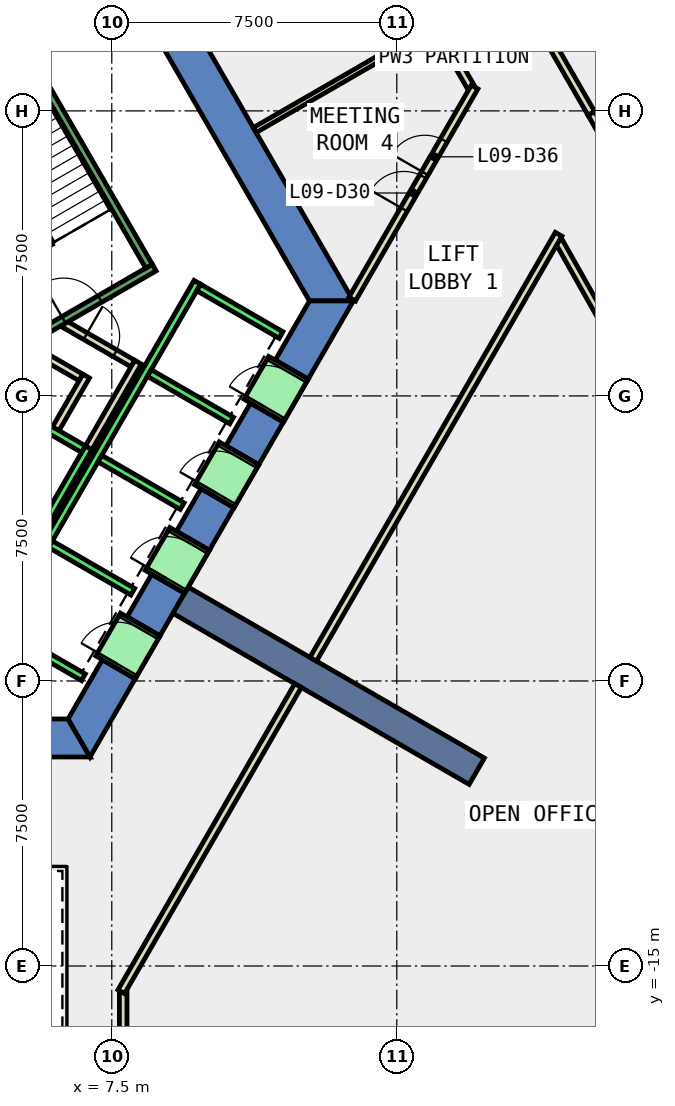
"""IFC4 building model, lengths in metres.
Left out: names, types, materials, properties, quantities, classifications, styles, units other than length and angle.
Written with IfcOpenShell. Run it as: python <this file> out.ifc"""

import sys

from ifc_helpers import new_model, si_unit, direction, frame, frame_2d, origin, place, context, subcontext, project, spatial, polyline, rectangle, outline, extrude, element, fill, save


model = new_model("IFC4")
c1 = context("Model", 3, precision=1e-05, world=origin(), true_north=direction((0.0, 1.0)))
c2 = subcontext(c1, "Body", "Model", "MODEL_VIEW")
j1 = project(units=[si_unit("LENGTHUNIT", "METRE"), si_unit("PLANEANGLEUNIT", "RADIAN")], contexts=[c1])
p1 = place(None, origin())
s1 = spatial("IfcSite", under=j1, at=p1, CompositionType="ELEMENT")
p2 = place(p1, origin())
s2 = spatial("IfcBuilding", under=s1, at=p2, CompositionType="ELEMENT")
p3 = place(p2, frame((0.0, 0.0, 47.6)))
s3 = spatial("IfcBuildingStorey", under=s2, at=p3, CompositionType="ELEMENT", Elevation=47.6)
p4 = place(p3, frame((0.0, 0.0, -0.4)))
e1 = element("IfcWall", 1, at=p4, inside=s3, PredefinedType="SHEAR", context=c2, shape_type="SweptSolid", body=[
    extrude(outline(polyline([(8.517, 11.748), (7.651, 11.248), (12.702, 2.5), (13.856, 2.5), (8.517, 11.748)])), origin(), (0.0, 0.0, 1.0), 4.2),
])
p5 = place(p3, frame((0.0, 0.0, -0.4)))
e2 = element("IfcWall", 2, at=p5, inside=s3, PredefinedType="SHEAR", context=c2, shape_type="SweptSolid", body=[
    extrude(outline(polyline([(5.75, -8.5), (5.75, -9.5), (6.928, -9.5), (6.351, -8.5), (5.75, -8.5)])), origin(), (0.0, 0.0, 1.0), 4.2),
])
p6 = place(p3, frame((0.0, 0.0, -0.4)))
e3 = element("IfcWall", 3, at=p6, inside=s3, PredefinedType="SHEAR", context=c2, shape_type="SweptSolid", body=[
    extrude(outline(polyline([(8.117, -7.44), (7.252, -6.94), (6.351, -8.5), (6.928, -9.5), (8.117, -7.44)])), origin(), (0.0, 0.0, 1.0), 4.2),
])
p7 = place(p3, frame((0.0, 0.0, -0.4)))
e4 = element("IfcWall", 4, at=p7, inside=s3, PredefinedType="SHEAR", context=c2, shape_type="SweptSolid", body=[
    extrude(outline(polyline([(9.417, -5.189), (8.551, -4.689), (7.902, -5.814), (8.767, -6.314), (9.417, -5.189)])), origin(), (0.0, 0.0, 1.0), 4.2),
])
p8 = place(p3, frame((0.0, 0.0, -0.4)))
e5 = element("IfcWall", 5, at=p8, inside=s3, PredefinedType="SHEAR", context=c2, shape_type="SweptSolid", body=[
    extrude(outline(polyline([(10.717, -2.937), (9.851, -2.437), (9.201, -3.563), (10.067, -4.063), (10.717, -2.937)])), origin(), (0.0, 0.0, 1.0), 4.2),
])
p9 = place(p3, frame((0.0, 0.0, -0.4)))
e6 = element("IfcWall", 6, at=p9, inside=s3, PredefinedType="SHEAR", context=c2, shape_type="SweptSolid", body=[
    extrude(outline(polyline([(12.017, -0.686), (11.151, -0.186), (10.501, -1.311), (11.367, -1.811), (12.017, -0.686)])), origin(), (0.0, 0.0, 1.0), 4.2),
])
p10 = place(p3, frame((0.0, 0.0, -0.4)))
e7 = element("IfcWall", 7, at=p10, inside=s3, PredefinedType="SHEAR", context=c2, shape_type="SweptSolid", body=[
    extrude(outline(polyline([(11.801, 0.94), (12.667, 0.44), (13.856, 2.5), (12.702, 2.5), (11.801, 0.94)])), origin(), (0.0, 0.0, 1.0), 4.2),
])
p11 = place(p3, frame((0.0, 0.0, 3.6)))
e8 = element("IfcWall", 8, at=p11, inside=s3, PredefinedType="SHEAR", context=c2, shape_type="SweptSolid", body=[
    extrude(outline(polyline([(8.767, -6.314), (7.902, -5.814), (7.252, -6.94), (8.117, -7.44), (8.767, -6.314)])), origin(), (0.0, 0.0, 1.0), 0.2),
])
p12 = place(p3, frame((0.0, 0.0, 3.6)))
e9 = element("IfcWall", 9, at=p12, inside=s3, PredefinedType="SHEAR", context=c2, shape_type="SweptSolid", body=[
    extrude(outline(polyline([(10.067, -4.063), (9.201, -3.563), (8.551, -4.689), (9.417, -5.189), (10.067, -4.063)])), origin(), (0.0, 0.0, 1.0), 0.2),
])
p13 = place(p3, frame((0.0, 0.0, 3.6)))
e10 = element("IfcWall", 10, at=p13, inside=s3, PredefinedType="SHEAR", context=c2, shape_type="SweptSolid", body=[
    extrude(outline(polyline([(11.367, -1.811), (10.501, -1.311), (9.851, -2.437), (10.717, -2.937), (11.367, -1.811)])), origin(), (0.0, 0.0, 1.0), 0.2),
])
p14 = place(p3, frame((0.0, 0.0, 3.6)))
e11 = element("IfcWall", 11, at=p14, inside=s3, PredefinedType="SHEAR", context=c2, shape_type="SweptSolid", body=[
    extrude(outline(polyline([(12.667, 0.44), (11.801, 0.94), (11.151, -0.186), (12.017, -0.686), (12.667, 0.44)])), origin(), (0.0, 0.0, 1.0), 0.2),
])
p15 = place(p3, frame((9.31, -5.375, -0.4), z_axis=(0.0, 0.0, 1.0), x_axis=(0.866017533419, -0.500013631625, 0.0)))
e12 = element("IfcWall", 12, at=p15, inside=s3, PredefinedType="SHEAR", context=c2, shape_type="SweptSolid", body=[
    extrude(rectangle(XDim=9.0, YDim=0.8, at=frame_2d((4.5, 0.0))), origin(), (0.0, 0.0, 1.0), 4.2),
])
p16 = place(p3, frame((16.948, 8.128, 0.0), z_axis=(0.0, 0.0, 1.0), x_axis=(-0.499931460552, 0.866064971437, 0.0)))
e13 = element("IfcWall", 13, at=p16, inside=s3, PredefinedType="PARTITIONING", context=c2, shape_type="SweptSolid", body=[
    extrude(rectangle(XDim=1.786, YDim=0.2, at=frame_2d((0.893, 0.0))), origin(), (0.0, 0.0, 1.0), 3.8),
])
p17 = place(p3, frame((21.585, -0.045, 0.0), z_axis=(0.0, 0.0, 1.0), x_axis=(-0.491542684896, 0.870853483042, 0.0)))
e14 = element("IfcWall", 14, at=p17, inside=s3, PredefinedType="PARTITIONING", context=c2, shape_type="SweptSolid", body=[
    extrude(rectangle(XDim=4.738, YDim=0.2, at=frame_2d((2.369, 0.0))), origin(), (0.0, 0.0, 1.0), 3.8),
])
p18 = place(p3, frame((16.46, 13.772, 0.0), z_axis=(0.0, 0.0, 1.0), x_axis=(0.500099745063, -0.865967808286, 0.0)))
e15 = element("IfcWall", 15, at=p18, inside=s3, PredefinedType="PARTITIONING", context=c2, shape_type="SweptSolid", body=[
    extrude(rectangle(XDim=7.319, YDim=0.2, at=frame_2d((3.659, 0.0))), origin(), (0.0, 0.0, 1.0), 3.8),
])
p19 = place(p18, frame((3.159, 0.0, 0.0)))
e16 = element("IfcOpeningElement", 16, at=p19, cuts=e15, PredefinedType="OPENING", context=c2, shape_type="SweptSolid", body=[
    extrude(rectangle(XDim=1.0, YDim=2.1, at=frame_2d((0.5, 1.05))), frame((0.0, 0.11, 0.0), z_axis=(0.0, -1.0, 0.0), x_axis=(1.0, 0.0, 0.0)), (0.0, 0.0, 1.0), 0.22),
])
p20 = place(p3, frame((20.12, 7.434, 0.0), z_axis=(0.0, 0.0, 1.0), x_axis=(0.491394823876, -0.87093692485, 0.0)))
e17 = element("IfcWall", 17, at=p20, inside=s3, PredefinedType="PARTITIONING", context=c2, shape_type="SweptSolid", body=[
    extrude(rectangle(XDim=3.547, YDim=0.2, at=frame_2d((1.773, 0.0))), origin(), (0.0, 0.0, 1.0), 3.8),
])
p21 = place(p3, frame((5.499, 1.172, 0.0), z_axis=(0.0, 0.0, 1.0), x_axis=(0.866333505267, -0.499465972466, 0.0)))
e18 = element("IfcWall", 18, at=p21, inside=s3, PredefinedType="PARTITIONING", context=c2, shape_type="SweptSolid", body=[
    extrude(rectangle(XDim=1.374, YDim=0.2, at=frame_2d((0.687, 0.0))), origin(), (0.0, 0.0, 1.0), 3.8),
])
p22 = place(p3, frame((6.826, 0.522, 0.0), z_axis=(0.0, 0.0, 1.0), x_axis=(-0.500016722714, -0.866015748706, 0.0)))
e19 = element("IfcWall", 19, at=p22, inside=s3, PredefinedType="PARTITIONING", context=c2, shape_type="SweptSolid", body=[
    extrude(rectangle(XDim=1.7, YDim=0.2, at=frame_2d((0.85, 0.0))), origin(), (0.0, 0.0, 1.0), 3.8),
])
p23 = place(p3, frame((6.25, 1.894, 0.0), z_axis=(0.0, 0.0, 1.0), x_axis=(0.866043184279, -0.499969202016, 0.0)))
e20 = element("IfcWall", 20, at=p23, inside=s3, PredefinedType="PARTITIONING", context=c2, shape_type="SweptSolid", body=[
    extrude(rectangle(XDim=2.084, YDim=0.2, at=frame_2d((1.042, 0.0))), origin(), (0.0, 0.0, 1.0), 3.8),
])
p24 = place(p23, frame((0.642, 0.0, 0.0)))
e21 = element("IfcOpeningElement", 21, at=p24, cuts=e20, PredefinedType="OPENING", context=c2, shape_type="SweptSolid", body=[
    extrude(rectangle(XDim=0.9, YDim=2.1, at=frame_2d((0.45, 1.05))), frame((0.0, 0.11, 0.0), z_axis=(0.0, -1.0, 0.0), x_axis=(1.0, 0.0, 0.0)), (0.0, 0.0, 1.0), 0.22),
])
p25 = place(p3, frame((8.192, 0.888, 0.0), z_axis=(0.0, 0.0, 1.0), x_axis=(-0.499940625693, -0.866059680843, 0.0)))
e22 = element("IfcWall", 22, at=p25, inside=s3, PredefinedType="PARTITIONING", context=c2, shape_type="SweptSolid", body=[
    extrude(rectangle(XDim=2.68, YDim=0.2, at=frame_2d((1.34, 0.0))), origin(), (0.0, 0.0, 1.0), 3.8),
])
p26 = place(p3, frame((16.104, 9.79, 0.0), z_axis=(0.0, 0.0, 1.0), x_axis=(-0.866023462144, -0.500003363005, 0.0)))
e23 = element("IfcWall", 23, at=p26, inside=s3, PredefinedType="PARTITIONING", context=c2, shape_type="SweptSolid", body=[
    extrude(rectangle(XDim=5.592, YDim=0.15, at=frame_2d((2.796, 0.0))), origin(), (0.0, 0.0, 1.0), 3.8),
])
p27 = place(p3, frame((13.827, 2.55, 0.0), z_axis=(0.0, 0.0, 1.0), x_axis=(0.500093193185, 0.865971591988, 0.0)))
e24 = element("IfcWall", 24, at=p27, inside=s3, PredefinedType="PARTITIONING", context=c2, shape_type="SweptSolid", body=[
    extrude(rectangle(XDim=6.441, YDim=0.2, at=frame_2d((3.221, 0.0))), origin(), (0.0, 0.0, 1.0), 3.8),
])
p28 = place(p27, frame((2.721, 0.0, 0.0)))
e25 = element("IfcOpeningElement", 25, at=p28, cuts=e24, PredefinedType="OPENING", context=c2, shape_type="SweptSolid", body=[
    extrude(rectangle(XDim=1.0, YDim=2.1, at=frame_2d((0.5, 1.05))), frame((0.0, 0.11, 0.0), z_axis=(0.0, -1.0, 0.0), x_axis=(1.0, 0.0, 0.0)), (0.0, 0.0, 1.0), 0.22),
])
p29 = place(p27, frame((3.821, 0.0, 0.0)))
e26 = element("IfcOpeningElement", 26, at=p29, cuts=e24, PredefinedType="OPENING", context=c2, shape_type="SweptSolid", body=[
    extrude(rectangle(XDim=1.0, YDim=2.1, at=frame_2d((0.5, 1.05))), frame((0.0, 0.11, 0.0), z_axis=(0.0, -1.0, 0.0), x_axis=(1.0, 0.0, 0.0)), (0.0, 0.0, 1.0), 0.22),
])
p30 = place(p3, frame((7.8, -15.69, 0.0), z_axis=(0.0, 0.0, 1.0), x_axis=(0.0, -1.0, 0.0)))
e27 = element("IfcWall", 27, at=p30, inside=s3, PredefinedType="PARTITIONING", context=c2, shape_type="SweptSolid", body=[
    extrude(rectangle(XDim=2.919, YDim=0.2, at=frame_2d((1.459, 0.0))), origin(), (0.0, 0.0, 1.0), 3.8),
])
p31 = place(p3, frame((19.257, 4.255, 0.0), z_axis=(0.0, 0.0, 1.0), x_axis=(-0.499978317034, -0.866037922089, 0.0)))
e28 = element("IfcWall", 28, at=p31, inside=s3, PredefinedType="PARTITIONING", context=c2, shape_type="SweptSolid", body=[
    extrude(rectangle(XDim=12.913, YDim=0.2, at=frame_2d((6.456, 0.0))), origin(), (0.0, 0.0, 1.0), 3.8),
])
p32 = place(p3, frame((12.401, -7.621, 0.0), z_axis=(0.0, 0.0, 1.0), x_axis=(-0.499983724212, -0.866034800411, 0.0)))
e29 = element("IfcWall", 29, at=p32, inside=s3, PredefinedType="PARTITIONING", context=c2, shape_type="SweptSolid", body=[
    extrude(rectangle(XDim=9.302, YDim=0.2, at=frame_2d((4.651, 0.0))), origin(), (0.0, 0.0, 1.0), 3.8),
])
p33 = place(p3, frame((5.492, -3.788, 0.0), z_axis=(0.0, 0.0, 1.0), x_axis=(0.500011755427, 0.866018616679, 0.0)))
e30 = element("IfcWall", 30, at=p33, inside=s3, PredefinedType="STANDARD", context=c2, shape_type="SweptSolid", body=[
    extrude(rectangle(XDim=2.8, YDim=0.2, at=frame_2d((1.4, 0.0))), origin(), (0.0, 0.0, 1.0), 3.8),
])
p34 = place(p3, frame((4.677, -0.2, 0.0), z_axis=(0.0, 0.0, 1.0), x_axis=(0.865973769406, -0.500089422704, 0.0)))
e31 = element("IfcWall", 31, at=p34, inside=s3, PredefinedType="STANDARD", context=c2, shape_type="SweptSolid", body=[
    extrude(rectangle(XDim=2.399, YDim=0.2, at=frame_2d((1.2, 0.0))), origin(), (0.0, 0.0, 1.0), 3.8),
])
p35 = place(p3, frame((4.451, -6.19, 0.0), z_axis=(0.0, 0.0, 1.0), x_axis=(0.50000090737, 0.866024879913, 0.0)))
e32 = element("IfcWall", 32, at=p35, inside=s3, PredefinedType="STANDARD", context=c2, shape_type="SweptSolid", body=[
    extrude(rectangle(XDim=10.6, YDim=0.2, at=frame_2d((5.3, 0.0))), origin(), (0.0, 0.0, 1.0), 3.8),
])
for number, where, z_axis, x_axis in (
    (33, (4.588, -6.153, 0.0), (0.0, 0.0, 1.0), (0.866, -0.5, 0.0)),
    (34, (5.888, -3.902, 0.0), (0.0, 0.0, 1.0), (0.866, -0.5, 0.0)),
    (35, (7.188, -1.65, 0.0), (0.0, 0.0, 1.0), (0.866, -0.5, 0.0)),
    (36, (8.488, 0.602, 0.0), (0.0, 0.0, 1.0), (0.866, -0.5, 0.0)),
):
    element("IfcWall", number, at=place(p3, frame(where, z_axis=z_axis, x_axis=x_axis)), inside=s3, PredefinedType="STANDARD", context=c2, shape_type="SweptSolid", body=[
        extrude(rectangle(XDim=2.5, YDim=0.2, at=frame_2d((1.25, 0.0))), origin(), (0.0, 0.0, 1.0), 3.8),
    ])
p36 = place(p3, frame((9.788, 2.853, 0.0), z_axis=(0.0, 0.0, 1.0), x_axis=(0.865998541277, -0.500046524342, 0.0)))
e37 = element("IfcWall", 37, at=p36, inside=s3, PredefinedType="STANDARD", context=c2, shape_type="SweptSolid", body=[
    extrude(rectangle(XDim=2.5, YDim=0.2, at=frame_2d((1.25, 0.0))), origin(), (0.0, 0.0, 1.0), 3.8),
])
p37 = place(p3, frame((7.598, -7.14, 0.0), z_axis=(0.0, 0.0, 1.0), x_axis=(0.500362116554, 0.865816234728, 0.0)))
e38 = element("IfcWall", 38, at=p37, inside=s3, PredefinedType="STANDARD", context=c2, shape_type="SweptSolid", body=[
    extrude(rectangle(XDim=1.299, YDim=1.2, at=frame_2d((0.65, 0.0))), origin(), (0.0, 0.0, 1.0), 2.4),
])
p38 = place(p37, frame((0.1, 0.0, 0.0)))
e39 = element("IfcOpeningElement", 39, at=p38, cuts=e38, PredefinedType="OPENING", context=c2, shape_type="SweptSolid", body=[
    extrude(rectangle(XDim=1.1, YDim=2.3, at=frame_2d((0.55, 1.15))), frame((0.0, 0.61, 0.0), z_axis=(0.0, -1.0, 0.0), x_axis=(1.0, 0.0, 0.0)), (0.0, 0.0, 1.0), 1.22),
])
p39 = place(p3, frame((8.898, -4.889, 0.0), z_axis=(0.0, 0.0, 1.0), x_axis=(0.500036693733, 0.866004217611, 0.0)))
e40 = element("IfcWall", 40, at=p39, inside=s3, PredefinedType="STANDARD", context=c2, shape_type="SweptSolid", body=[
    extrude(rectangle(XDim=1.3, YDim=1.2, at=frame_2d((0.65, 0.0))), origin(), (0.0, 0.0, 1.0), 2.4),
])
p40 = place(p39, frame((0.1, 0.0, 0.0)))
e41 = element("IfcOpeningElement", 41, at=p40, cuts=e40, PredefinedType="OPENING", context=c2, shape_type="SweptSolid", body=[
    extrude(rectangle(XDim=1.1, YDim=2.3, at=frame_2d((0.55, 1.15))), frame((0.0, 0.61, 0.0), z_axis=(0.0, -1.0, 0.0), x_axis=(1.0, 0.0, 0.0)), (0.0, 0.0, 1.0), 1.22),
])
p41 = place(p3, frame((10.198, -2.637, 0.0), z_axis=(0.0, 0.0, 1.0), x_axis=(0.49989585183, 0.866085525409, 0.0)))
e42 = element("IfcWall", 42, at=p41, inside=s3, PredefinedType="STANDARD", context=c2, shape_type="SweptSolid", body=[
    extrude(rectangle(XDim=1.3, YDim=1.2, at=frame_2d((0.65, 0.0))), origin(), (0.0, 0.0, 1.0), 2.4),
])
p42 = place(p41, frame((0.1, 0.0, 0.0)))
e43 = element("IfcOpeningElement", 43, at=p42, cuts=e42, PredefinedType="OPENING", context=c2, shape_type="SweptSolid", body=[
    extrude(rectangle(XDim=1.1, YDim=2.3, at=frame_2d((0.55, 1.15))), frame((0.0, 0.61, 0.0), z_axis=(0.0, -1.0, 0.0), x_axis=(1.0, 0.0, 0.0)), (0.0, 0.0, 1.0), 1.22),
])
p43 = place(p3, frame((11.498, -0.385, 0.0), z_axis=(0.0, 0.0, 1.0), x_axis=(0.500221244143, 0.865897630733, 0.0)))
e44 = element("IfcWall", 44, at=p43, inside=s3, PredefinedType="STANDARD", context=c2, shape_type="SweptSolid", body=[
    extrude(rectangle(XDim=1.299, YDim=1.2, at=frame_2d((0.65, 0.0))), origin(), (0.0, 0.0, 1.0), 2.4),
])
p44 = place(p43, frame((0.1, 0.0, 0.0)))
e45 = element("IfcOpeningElement", 45, at=p44, cuts=e44, PredefinedType="OPENING", context=c2, shape_type="SweptSolid", body=[
    extrude(rectangle(XDim=1.1, YDim=2.3, at=frame_2d((0.55, 1.15))), frame((0.0, 0.61, 0.0), z_axis=(0.0, -1.0, 0.0), x_axis=(1.0, 0.0, 0.0)), (0.0, 0.0, 1.0), 1.22),
])
p45 = place(p3, frame((4.806, 1.176, 0.0), z_axis=(0.0, 0.0, 1.0), x_axis=(0.866059941101, 0.499940174841, 0.0)))
e46 = element("IfcWall", 46, at=p45, inside=s3, PredefinedType="STANDARD", context=c2, shape_type="SweptSolid", body=[
    extrude(rectangle(XDim=4.4, YDim=0.2, at=frame_2d((2.2, 0.0))), origin(), (0.0, 0.0, 1.0), 3.8),
])
p46 = place(p45, frame((1.65, 0.0, 0.0)))
e47 = element("IfcOpeningElement", 47, at=p46, cuts=e46, PredefinedType="OPENING", context=c2, shape_type="SweptSolid", body=[
    extrude(rectangle(XDim=1.1, YDim=2.2, at=frame_2d((0.55, 1.1))), frame((0.0, 0.11, 0.0), z_axis=(0.0, -1.0, 0.0), x_axis=(1.0, 0.0, 0.0)), (0.0, 0.0, 1.0), 0.22),
])
p47 = place(p3, frame((8.48, 3.412, 0.0), z_axis=(0.0, 0.0, 1.0), x_axis=(-0.499978703459, 0.866037698999, 0.0)))
e48 = element("IfcWall", 48, at=p47, inside=s3, PredefinedType="STANDARD", context=c2, shape_type="SweptSolid", body=[
    extrude(rectangle(XDim=6.9, YDim=0.2, at=frame_2d((3.45, 0.0))), origin(), (0.0, 0.0, 1.0), 3.8),
])
p48 = place(p28, origin())
e49 = element("IfcDoor", 49, at=p48, inside=s3, OperationType="SINGLE_SWING_LEFT", PredefinedType="DOOR", context=c2, shape_type="SweptSolid", body=[
    extrude(rectangle(XDim=1.0, YDim=2.1, at=frame_2d((0.5, 1.05))), frame((0.0, 0.025, 0.0), z_axis=(0.0, -1.0, 0.0), x_axis=(1.0, 0.0, 0.0)), (0.0, 0.0, 1.0), 0.05),
])
fill(e25, e49)
p49 = place(p24, origin())
e50 = element("IfcDoor", 50, at=p49, inside=s3, OperationType="SINGLE_SWING_LEFT", PredefinedType="DOOR", context=c2, shape_type="SweptSolid", body=[
    extrude(rectangle(XDim=0.9, YDim=2.1, at=frame_2d((0.45, 1.05))), frame((0.0, 0.025, 0.0), z_axis=(0.0, -1.0, 0.0), x_axis=(1.0, 0.0, 0.0)), (0.0, 0.0, 1.0), 0.05),
])
fill(e21, e50)
p50 = place(p29, origin())
e51 = element("IfcDoor", 51, at=p50, inside=s3, OperationType="SINGLE_SWING_RIGHT", PredefinedType="DOOR", context=c2, shape_type="SweptSolid", body=[
    extrude(rectangle(XDim=1.0, YDim=2.1, at=frame_2d((0.5, 1.05))), frame((0.0, 0.025, 0.0), z_axis=(0.0, -1.0, 0.0), x_axis=(1.0, 0.0, 0.0)), (0.0, 0.0, 1.0), 0.05),
])
fill(e26, e51)
p51 = place(p38, origin())
e52 = element("IfcDoor", 52, at=p51, inside=s3, OperationType="SLIDING_TO_LEFT", PredefinedType="DOOR", context=c2, shape_type="SweptSolid", body=[
    extrude(rectangle(XDim=1.1, YDim=2.3, at=frame_2d((0.55, 1.15))), frame((0.0, 0.025, 0.0), z_axis=(0.0, -1.0, 0.0), x_axis=(1.0, 0.0, 0.0)), (0.0, 0.0, 1.0), 0.05),
])
fill(e39, e52)
p52 = place(p40, origin())
e53 = element("IfcDoor", 53, at=p52, inside=s3, OperationType="SLIDING_TO_LEFT", PredefinedType="DOOR", context=c2, shape_type="SweptSolid", body=[
    extrude(rectangle(XDim=1.1, YDim=2.3, at=frame_2d((0.55, 1.15))), frame((0.0, 0.025, 0.0), z_axis=(0.0, -1.0, 0.0), x_axis=(1.0, 0.0, 0.0)), (0.0, 0.0, 1.0), 0.05),
])
fill(e41, e53)
p53 = place(p42, origin())
e54 = element("IfcDoor", 54, at=p53, inside=s3, OperationType="SLIDING_TO_LEFT", PredefinedType="DOOR", context=c2, shape_type="SweptSolid", body=[
    extrude(rectangle(XDim=1.1, YDim=2.3, at=frame_2d((0.55, 1.15))), frame((0.0, 0.025, 0.0), z_axis=(0.0, -1.0, 0.0), x_axis=(1.0, 0.0, 0.0)), (0.0, 0.0, 1.0), 0.05),
])
fill(e43, e54)
p54 = place(p44, origin())
e55 = element("IfcDoor", 55, at=p54, inside=s3, OperationType="SLIDING_TO_LEFT", PredefinedType="DOOR", context=c2, shape_type="SweptSolid", body=[
    extrude(rectangle(XDim=1.1, YDim=2.3, at=frame_2d((0.55, 1.15))), frame((0.0, 0.025, 0.0), z_axis=(0.0, -1.0, 0.0), x_axis=(1.0, 0.0, 0.0)), (0.0, 0.0, 1.0), 0.05),
])
fill(e45, e55)
p55 = place(p46, origin())
e56 = element("IfcDoor", 56, at=p55, inside=s3, OperationType="SINGLE_SWING_LEFT", PredefinedType="DOOR", context=c2, shape_type="SweptSolid", body=[
    extrude(rectangle(XDim=1.1, YDim=2.2, at=frame_2d((0.55, 1.1))), frame((0.0, 0.025, 0.0), z_axis=(0.0, -1.0, 0.0), x_axis=(1.0, 0.0, 0.0)), (0.0, 0.0, 1.0), 0.05),
])
fill(e47, e56)
save(model, sys.argv[1])
